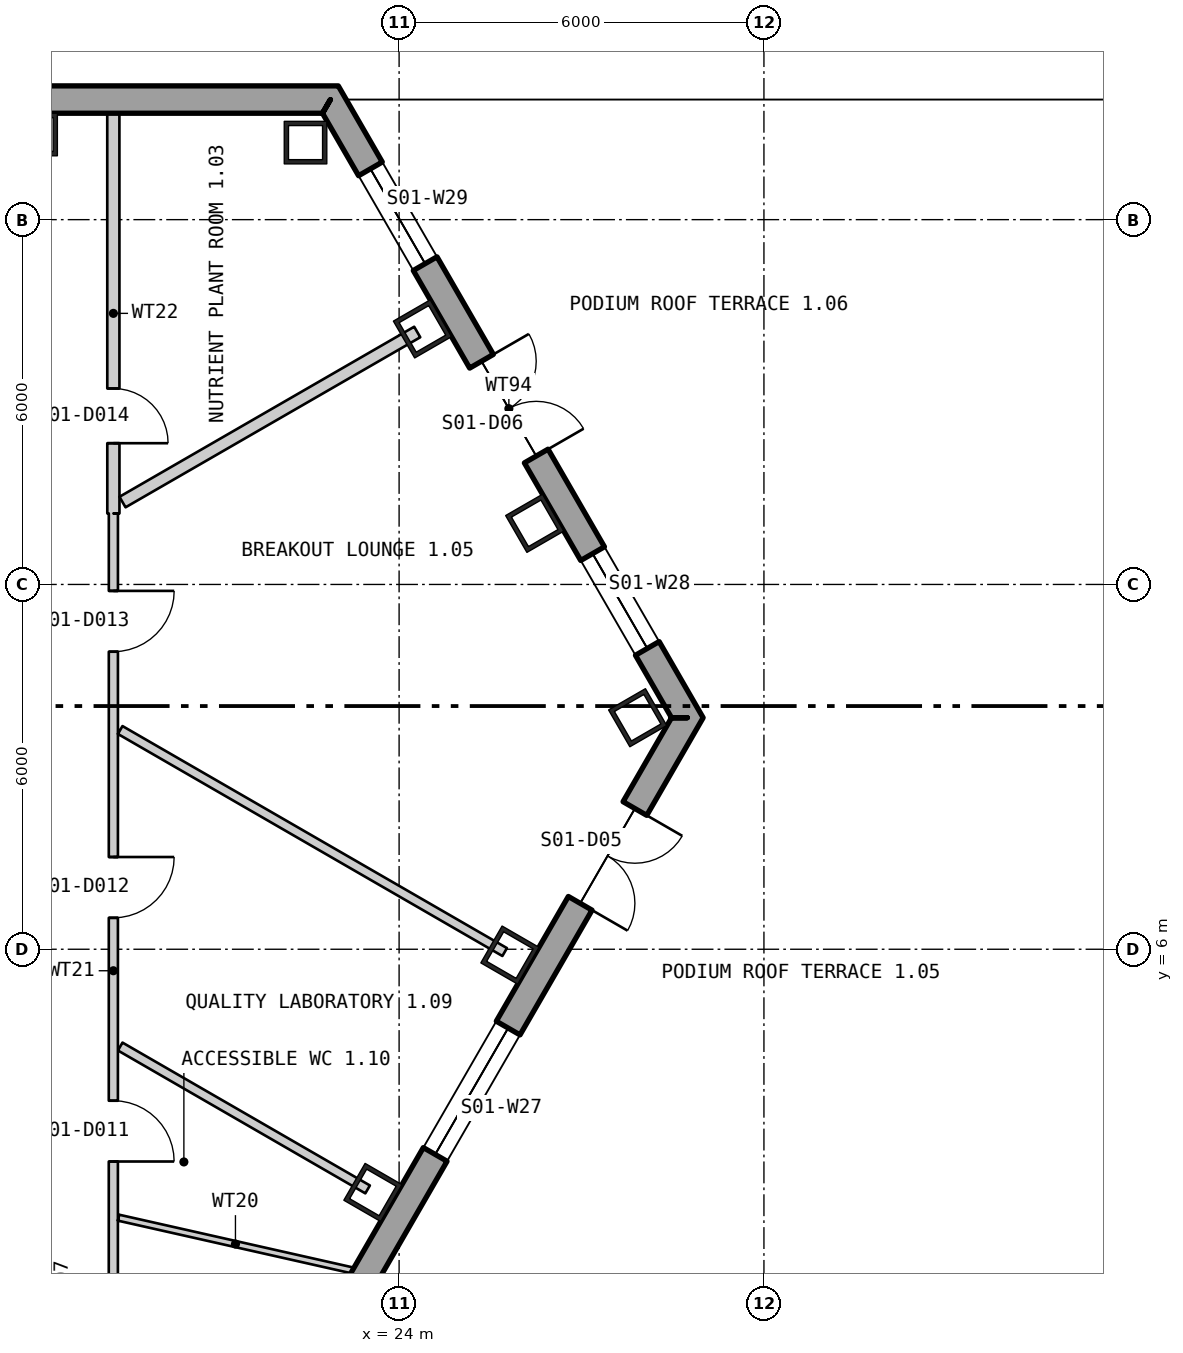
"""IFC4 building model, lengths in metres.
Left out: names, types, materials, properties, quantities, classifications, styles, units other than length and angle.
Written with IfcOpenShell. Run it as: python <this file> out.ifc"""

import sys

from ifc_helpers import new_model, si_unit, direction, frame, frame_2d, origin, origin_2d, place, context, subcontext, project, spatial, polyline, rectangle, hollow_rectangle, outline, extrude, element, fill, save


model = new_model("IFC4")
c1 = context("Model", 3, precision=1e-05, world=origin(), true_north=direction((0.0, 1.0)))
c2 = subcontext(c1, "Body", "Model", "MODEL_VIEW")
j1 = project(units=[si_unit("LENGTHUNIT", "METRE"), si_unit("PLANEANGLEUNIT", "RADIAN")], contexts=[c1])
p1 = place(None, origin())
s1 = spatial("IfcSite", under=j1, at=p1, CompositionType="ELEMENT")
p2 = place(p1, origin())
s2 = spatial("IfcBuilding", under=s1, at=p2, CompositionType="ELEMENT")
p3 = place(p2, frame((0.0, 0.0, 28.8)))
s3 = spatial("IfcBuildingStorey", under=s2, at=p3, CompositionType="ELEMENT", Elevation=28.8)
p4 = place(p3, frame((22.461, 19.267, 0.0), z_axis=(0.0, 0.0, 1.0), x_axis=(-1.0, 0.0, 0.0)))
e1 = element("IfcColumn", 1, at=p4, inside=s3, PredefinedType="COLUMN", context=c2, shape_type="SweptSolid", body=[
    extrude(hollow_rectangle(XDim=0.7, YDim=0.7, WallThickness=0.07, at=origin_2d()), origin(), (0.0, 0.0, 1.0), 4.5),
])
p5 = place(p3, frame((18.03, 19.4, -0.85), z_axis=(0.0, 0.0, 1.0), x_axis=(-1.0, 0.0, 0.0)))
e2 = element("IfcColumn", 2, at=p5, inside=s3, PredefinedType="COLUMN", context=c2, shape_type="SweptSolid", body=[
    extrude(hollow_rectangle(XDim=0.7, YDim=0.7, WallThickness=0.07, at=origin_2d()), origin(), (0.0, 0.0, 1.0), 5.35),
])
p6 = place(p3, frame((23.569, 2.0, 0.0), z_axis=(0.0, 0.0, 1.0), x_axis=(0.5, 0.866025403784, 0.0)))
e3 = element("IfcColumn", 3, at=p6, inside=s3, PredefinedType="COLUMN", context=c2, shape_type="SweptSolid", body=[
    extrude(hollow_rectangle(XDim=0.7, YDim=0.7, WallThickness=0.07, at=origin_2d()), origin(), (0.0, 0.0, 1.0), 4.5),
])
p7 = place(p3, frame((25.822, 5.904, -0.85), z_axis=(0.0, 0.0, 1.0), x_axis=(0.5, 0.866025403784, 0.0)))
e4 = element("IfcColumn", 4, at=p7, inside=s3, PredefinedType="COLUMN", context=c2, shape_type="SweptSolid", body=[
    extrude(hollow_rectangle(XDim=0.7, YDim=0.7, WallThickness=0.07, at=origin_2d()), origin(), (0.0, 0.0, 1.0), 5.35),
])
p8 = place(p3, frame((27.923, 9.808, 0.0), z_axis=(0.0, 0.0, 1.0), x_axis=(-0.5, 0.866025403784, 0.0)))
e5 = element("IfcColumn", 5, at=p8, inside=s3, PredefinedType="COLUMN", context=c2, shape_type="SweptSolid", body=[
    extrude(hollow_rectangle(XDim=0.7, YDim=0.7, WallThickness=0.07, at=origin_2d()), origin(), (0.0, 0.0, 1.0), 4.5),
])
for number, where, z_axis, x_axis in (
    (6, (26.23, 13.005, -0.85), (0.0, 0.0, 1.0), (-0.5, 0.866, 0.0)),
    (7, (24.384, 16.203, -0.85), (0.0, 0.0, 1.0), (-0.5, 0.866, 0.0)),
):
    element("IfcColumn", number, at=place(p3, frame(where, z_axis=z_axis, x_axis=x_axis)), inside=s3, PredefinedType="COLUMN", context=c2, shape_type="SweptSolid", body=[
        extrude(hollow_rectangle(XDim=0.7, YDim=0.7, WallThickness=0.07, at=origin_2d()), origin(), (0.0, 0.0, 1.0), 5.35),
    ])
p9 = place(p3, frame((22.87, 19.975, -0.4), z_axis=(0.0, 0.0, 1.0), x_axis=(-1.0, 0.0, 0.0)))
e8 = element("IfcWall", 8, at=p9, inside=s3, PredefinedType="SOLIDWALL", context=c2, shape_type="SweptSolid", body=[
    extrude(outline(polyline([(-0.13, -0.225), (45.87, -0.225), (45.61, 0.225), (0.13, 0.225), (-0.13, -0.225)])), origin(), (0.0, 0.0, 1.0), 4.5),
])
p10 = place(p9, frame((5.893, 0.0, 1.3)))
e9 = element("IfcOpeningElement", 9, at=p10, cuts=e8, PredefinedType="OPENING", context=c2, shape_type="SweptSolid", body=[
    extrude(rectangle(XDim=2.4, YDim=2.6, at=frame_2d((1.2, 1.3))), frame((0.0, 0.235, 0.0), z_axis=(0.0, -1.0, 0.0), x_axis=(1.0, 0.0, 0.0)), (0.0, 0.0, 1.0), 0.47),
])
p11 = place(p9, frame((10.401, 0.0, 1.3)))
e10 = element("IfcOpeningElement", 10, at=p11, cuts=e8, PredefinedType="OPENING", context=c2, shape_type="SweptSolid", body=[
    extrude(rectangle(XDim=2.4, YDim=2.6, at=frame_2d((1.2, 1.3))), frame((0.0, 0.235, 0.0), z_axis=(0.0, -1.0, 0.0), x_axis=(1.0, 0.0, 0.0)), (0.0, 0.0, 1.0), 0.47),
])
p12 = place(p9, frame((14.909, 0.0, 1.3)))
e11 = element("IfcOpeningElement", 11, at=p12, cuts=e8, PredefinedType="OPENING", context=c2, shape_type="SweptSolid", body=[
    extrude(rectangle(XDim=2.4, YDim=2.6, at=frame_2d((1.2, 1.3))), frame((0.0, 0.235, 0.0), z_axis=(0.0, -1.0, 0.0), x_axis=(1.0, 0.0, 0.0)), (0.0, 0.0, 1.0), 0.47),
])
p13 = place(p9, frame((19.416, 0.0, 1.3)))
e12 = element("IfcOpeningElement", 12, at=p13, cuts=e8, PredefinedType="OPENING", context=c2, shape_type="SweptSolid", body=[
    extrude(rectangle(XDim=2.4, YDim=2.6, at=frame_2d((1.2, 1.3))), frame((0.0, 0.235, 0.0), z_axis=(0.0, -1.0, 0.0), x_axis=(1.0, 0.0, 0.0)), (0.0, 0.0, 1.0), 0.47),
])
p14 = place(p9, frame((23.924, 0.0, 1.3)))
e13 = element("IfcOpeningElement", 13, at=p14, cuts=e8, PredefinedType="OPENING", context=c2, shape_type="SweptSolid", body=[
    extrude(rectangle(XDim=2.4, YDim=2.6, at=frame_2d((1.2, 1.3))), frame((0.0, 0.235, 0.0), z_axis=(0.0, -1.0, 0.0), x_axis=(1.0, 0.0, 0.0)), (0.0, 0.0, 1.0), 0.47),
])
p15 = place(p9, frame((28.431, 0.0, 1.3)))
e14 = element("IfcOpeningElement", 14, at=p15, cuts=e8, PredefinedType="OPENING", context=c2, shape_type="SweptSolid", body=[
    extrude(rectangle(XDim=2.4, YDim=2.6, at=frame_2d((1.2, 1.3))), frame((0.0, 0.235, 0.0), z_axis=(0.0, -1.0, 0.0), x_axis=(1.0, 0.0, 0.0)), (0.0, 0.0, 1.0), 0.47),
])
p16 = place(p9, frame((32.939, 0.0, 1.3)))
e15 = element("IfcOpeningElement", 15, at=p16, cuts=e8, PredefinedType="OPENING", context=c2, shape_type="SweptSolid", body=[
    extrude(rectangle(XDim=2.4, YDim=2.6, at=frame_2d((1.2, 1.3))), frame((0.0, 0.235, 0.0), z_axis=(0.0, -1.0, 0.0), x_axis=(1.0, 0.0, 0.0)), (0.0, 0.0, 1.0), 0.47),
])
p17 = place(p9, frame((37.447, 0.0, 1.3)))
e16 = element("IfcOpeningElement", 16, at=p17, cuts=e8, PredefinedType="OPENING", context=c2, shape_type="SweptSolid", body=[
    extrude(rectangle(XDim=2.4, YDim=2.6, at=frame_2d((1.2, 1.3))), frame((0.0, 0.235, 0.0), z_axis=(0.0, -1.0, 0.0), x_axis=(1.0, 0.0, 0.0)), (0.0, 0.0, 1.0), 0.47),
])
p18 = place(p3, frame((5.87, -29.805, -0.23), z_axis=(0.0, 0.0, 1.0), x_axis=(0.499999764979, 0.866025539474, 0.0)))
e17 = element("IfcWall", 17, at=p18, inside=s3, PredefinedType="SOLIDWALL", context=c2, shape_type="SweptSolid", body=[
    extrude(outline(polyline([(-0.13, -0.225), (45.87, -0.225), (45.61, 0.225), (0.13, 0.225), (-0.13, -0.225)])), origin(), (0.0, 0.0, 1.0), 4.55),
])
p19 = place(p18, frame((1.424, 0.0, 1.13)))
e18 = element("IfcOpeningElement", 18, at=p19, cuts=e17, PredefinedType="OPENING", context=c2, shape_type="SweptSolid", body=[
    extrude(rectangle(XDim=2.4, YDim=2.6, at=frame_2d((1.2, 1.3))), frame((0.0, 0.235, 0.0), z_axis=(0.0, -1.0, 0.0), x_axis=(1.0, 0.0, 0.0)), (0.0, 0.0, 1.0), 0.47),
])
p20 = place(p18, frame((5.893, 0.0, 1.13)))
e19 = element("IfcOpeningElement", 19, at=p20, cuts=e17, PredefinedType="OPENING", context=c2, shape_type="SweptSolid", body=[
    extrude(rectangle(XDim=2.4, YDim=2.6, at=frame_2d((1.2, 1.3))), frame((0.0, 0.235, 0.0), z_axis=(0.0, -1.0, 0.0), x_axis=(1.0, 0.0, 0.0)), (0.0, 0.0, 1.0), 0.47),
])
p21 = place(p18, frame((10.701, 0.0, 0.23)))
e20 = element("IfcOpeningElement", 20, at=p21, cuts=e17, PredefinedType="OPENING", context=c2, shape_type="SweptSolid", body=[
    extrude(rectangle(XDim=1.8, YDim=2.4, at=frame_2d((0.9, 1.2))), frame((0.0, 0.235, 0.0), z_axis=(0.0, -1.0, 0.0), x_axis=(1.0, 0.0, 0.0)), (0.0, 0.0, 1.0), 0.47),
])
p22 = place(p18, frame((14.909, 0.0, 1.13)))
e21 = element("IfcOpeningElement", 21, at=p22, cuts=e17, PredefinedType="OPENING", context=c2, shape_type="SweptSolid", body=[
    extrude(rectangle(XDim=2.4, YDim=2.6, at=frame_2d((1.2, 1.3))), frame((0.0, 0.235, 0.0), z_axis=(0.0, -1.0, 0.0), x_axis=(1.0, 0.0, 0.0)), (0.0, 0.0, 1.0), 0.47),
])
p23 = place(p18, frame((19.416, 0.0, 1.13)))
e22 = element("IfcOpeningElement", 22, at=p23, cuts=e17, PredefinedType="OPENING", context=c2, shape_type="SweptSolid", body=[
    extrude(rectangle(XDim=2.4, YDim=2.6, at=frame_2d((1.2, 1.3))), frame((0.0, 0.235, 0.0), z_axis=(0.0, -1.0, 0.0), x_axis=(1.0, 0.0, 0.0)), (0.0, 0.0, 1.0), 0.47),
])
p24 = place(p18, frame((23.924, 0.0, 1.13)))
e23 = element("IfcOpeningElement", 23, at=p24, cuts=e17, PredefinedType="OPENING", context=c2, shape_type="SweptSolid", body=[
    extrude(rectangle(XDim=2.4, YDim=2.6, at=frame_2d((1.2, 1.3))), frame((0.0, 0.235, 0.0), z_axis=(0.0, -1.0, 0.0), x_axis=(1.0, 0.0, 0.0)), (0.0, 0.0, 1.0), 0.47),
])
p25 = place(p18, frame((37.447, 0.0, 1.13)))
e24 = element("IfcOpeningElement", 24, at=p25, cuts=e17, PredefinedType="OPENING", context=c2, shape_type="SweptSolid", body=[
    extrude(rectangle(XDim=2.4, YDim=2.6, at=frame_2d((1.2, 1.3))), frame((0.0, 0.235, 0.0), z_axis=(0.0, -1.0, 0.0), x_axis=(1.0, 0.0, 0.0)), (0.0, 0.0, 1.0), 0.47),
])
p26 = place(p18, frame((42.216, 0.0, 0.23)))
e25 = element("IfcOpeningElement", 25, at=p26, cuts=e17, PredefinedType="OPENING", context=c2, shape_type="SweptSolid", body=[
    extrude(rectangle(XDim=1.8, YDim=2.4, at=frame_2d((0.9, 1.2))), frame((0.0, 0.235, 0.0), z_axis=(0.0, -1.0, 0.0), x_axis=(1.0, 0.0, 0.0)), (0.0, 0.0, 1.0), 0.47),
])
p27 = place(p3, frame((28.74, 9.808, -0.23), z_axis=(0.0, 0.0, 1.0), x_axis=(-0.500000422144, 0.866025160059, 0.0)))
e26 = element("IfcWall", 26, at=p27, inside=s3, PredefinedType="SOLIDWALL", context=c2, shape_type="SweptSolid", body=[
    extrude(outline(polyline([(-0.13, -0.225), (11.87, -0.225), (11.61, 0.225), (0.13, 0.225), (-0.13, -0.225)])), origin(), (0.0, 0.0, 1.0), 4.33),
])
p28 = place(p27, frame((1.316, 0.0, 1.13)))
e27 = element("IfcOpeningElement", 27, at=p28, cuts=e26, PredefinedType="OPENING", context=c2, shape_type="SweptSolid", body=[
    extrude(rectangle(XDim=1.8, YDim=2.6, at=frame_2d((0.9, 1.3))), frame((0.0, 0.235, 0.0), z_axis=(0.0, -1.0, 0.0), x_axis=(1.0, 0.0, 0.0)), (0.0, 0.0, 1.0), 0.47),
])
p29 = place(p27, frame((4.97, 0.0, 0.23)))
e28 = element("IfcOpeningElement", 28, at=p29, cuts=e26, PredefinedType="OPENING", context=c2, shape_type="SweptSolid", body=[
    extrude(rectangle(XDim=1.8, YDim=2.4, at=frame_2d((0.9, 1.2))), frame((0.0, 0.235, 0.0), z_axis=(0.0, -1.0, 0.0), x_axis=(1.0, 0.0, 0.0)), (0.0, 0.0, 1.0), 0.47),
])
p30 = place(p27, frame((8.624, 0.0, 1.13)))
e29 = element("IfcOpeningElement", 29, at=p30, cuts=e26, PredefinedType="OPENING", context=c2, shape_type="SweptSolid", body=[
    extrude(rectangle(XDim=1.8, YDim=2.6, at=frame_2d((0.9, 1.3))), frame((0.0, 0.235, 0.0), z_axis=(0.0, -1.0, 0.0), x_axis=(1.0, 0.0, 0.0)), (0.0, 0.0, 1.0), 0.47),
])
p31 = place(p3, frame((38.85, 19.975, -0.4), z_axis=(0.0, 0.0, 1.0), x_axis=(-1.0, 0.0, 0.0)))
e30 = element("IfcWall", 30, at=p31, inside=s3, PredefinedType="PARAPET", context=c2, shape_type="SweptSolid", body=[
    extrude(outline(polyline([(-0.15, -0.15), (15.85, -0.15), (15.85, 0.15), (0.15, 0.15), (-0.15, -0.15)])), origin(), (0.0, 0.0, 1.0), 1.5),
])
p32 = place(p3, frame((19.3, -1.875, 0.0), z_axis=(0.0, 0.0, 1.0), x_axis=(6.6476102e-05, 0.99999999779, 0.0)))
e31 = element("IfcWall", 31, at=p32, inside=s3, PredefinedType="PARTITIONING", context=c2, shape_type="SweptSolid", body=[
    extrude(rectangle(XDim=15.043, YDim=0.15, at=frame_2d((7.521, 0.0))), origin(), (0.0, 0.0, 1.0), 4.3),
])
p33 = place(p32, frame((1.277, 0.0, 0.0)))
e32 = element("IfcOpeningElement", 32, at=p33, cuts=e31, PredefinedType="OPENING", context=c2, shape_type="SweptSolid", body=[
    extrude(rectangle(XDim=1.0, YDim=2.1, at=frame_2d((0.5, 1.05))), frame((0.0, 0.085, 0.0), z_axis=(0.0, -1.0, 0.0), x_axis=(1.0, 0.0, 0.0)), (0.0, 0.0, 1.0), 0.17),
])
p34 = place(p32, frame((4.384, 0.0, 0.0)))
e33 = element("IfcOpeningElement", 33, at=p34, cuts=e31, PredefinedType="OPENING", context=c2, shape_type="SweptSolid", body=[
    extrude(rectangle(XDim=1.0, YDim=2.1, at=frame_2d((0.5, 1.05))), frame((0.0, 0.085, 0.0), z_axis=(0.0, -1.0, 0.0), x_axis=(1.0, 0.0, 0.0)), (0.0, 0.0, 1.0), 0.17),
])
p35 = place(p32, frame((8.392, 0.0, 0.0)))
e34 = element("IfcOpeningElement", 34, at=p35, cuts=e31, PredefinedType="OPENING", context=c2, shape_type="SweptSolid", body=[
    extrude(rectangle(XDim=1.0, YDim=2.1, at=frame_2d((0.5, 1.05))), frame((0.0, 0.085, 0.0), z_axis=(0.0, -1.0, 0.0), x_axis=(1.0, 0.0, 0.0)), (0.0, 0.0, 1.0), 0.17),
])
p36 = place(p32, frame((12.769, 0.0, 0.0)))
e35 = element("IfcOpeningElement", 35, at=p36, cuts=e31, PredefinedType="OPENING", context=c2, shape_type="SweptSolid", body=[
    extrude(rectangle(XDim=1.0, YDim=2.1, at=frame_2d((0.5, 1.05))), frame((0.0, 0.085, 0.0), z_axis=(0.0, -1.0, 0.0), x_axis=(1.0, 0.0, 0.0)), (0.0, 0.0, 1.0), 0.17),
])
p37 = place(p3, frame((19.3, 19.749, 0.0), z_axis=(0.0, 0.0, 1.0), x_axis=(0.000151952589, -0.999999988455, 0.0)))
e36 = element("IfcWall", 36, at=p37, inside=s3, PredefinedType="PARTITIONING", context=c2, shape_type="SweptSolid", body=[
    extrude(rectangle(XDim=6.581, YDim=0.2, at=frame_2d((3.291, 0.0))), origin(), (0.0, 0.0, 1.0), 4.3),
])
p38 = place(p37, frame((4.526, 0.0, 0.0)))
e37 = element("IfcOpeningElement", 37, at=p38, cuts=e36, PredefinedType="OPENING", context=c2, shape_type="SweptSolid", body=[
    extrude(rectangle(XDim=0.9, YDim=2.1, at=frame_2d((0.45, 1.05))), frame((0.0, 0.11, 0.0), z_axis=(0.0, -1.0, 0.0), x_axis=(1.0, 0.0, 0.0)), (0.0, 0.0, 1.0), 0.22),
])
p39 = place(p3, frame((19.386, 1.585, 0.0), z_axis=(0.0, 0.0, 1.0), x_axis=(0.975507775366, -0.219964952209, 0.0)))
e38 = element("IfcWall", 38, at=p39, inside=s3, PredefinedType="PARTITIONING", context=c2, shape_type="SweptSolid", body=[
    extrude(rectangle(XDim=3.942, YDim=0.1, at=frame_2d((1.971, 0.0))), origin(), (0.0, 0.0, 1.0), 4.3),
])
p40 = place(p3, frame((19.413, 4.4, 0.0), z_axis=(0.0, 0.0, 1.0), x_axis=(0.865955197451, -0.500121581226, 0.0)))
e39 = element("IfcWall", 39, at=p40, inside=s3, PredefinedType="PARTITIONING", context=c2, shape_type="SweptSolid", body=[
    extrude(rectangle(XDim=4.699, YDim=0.15, at=frame_2d((2.349, 0.0))), origin(), (0.0, 0.0, 1.0), 4.3),
])
p41 = place(p3, frame((19.413, 9.606, 0.0), z_axis=(0.0, 0.0, 1.0), x_axis=(0.865941524513, -0.500145255025, 0.0)))
e40 = element("IfcWall", 40, at=p41, inside=s3, PredefinedType="PARTITIONING", context=c2, shape_type="SweptSolid", body=[
    extrude(rectangle(XDim=7.302, YDim=0.15, at=frame_2d((3.651, 0.0))), origin(), (0.0, 0.0, 1.0), 4.3),
])
p42 = place(p3, frame((19.451, 13.355, 0.0), z_axis=(0.0, 0.0, 1.0), x_axis=(0.866135007536, 0.499810112663, 0.0)))
e41 = element("IfcWall", 41, at=p42, inside=s3, PredefinedType="PARTITIONING", context=c2, shape_type="SweptSolid", body=[
    extrude(rectangle(XDim=5.596, YDim=0.2, at=frame_2d((2.798, 0.0))), origin(), (0.0, 0.0, 1.0), 4.3),
])
p43 = place(p25, origin())
e42 = element("IfcWindow", 42, at=p43, inside=s3, PartitioningType="SINGLE_PANEL", PredefinedType="WINDOW", context=c2, shape_type="SweptSolid", body=[
    extrude(rectangle(XDim=2.4, YDim=2.6, at=frame_2d((1.2, 1.3))), frame((0.0, 0.105, 0.0), z_axis=(0.0, -1.0, 0.0), x_axis=(1.0, 0.0, 0.0)), (0.0, 0.0, 1.0), 0.06),
])
fill(e24, e42)
p44 = place(p26, frame((1.8, 0.0, 0.0), z_axis=(0.0, 0.0, 1.0), x_axis=(-1.0, 0.0, 0.0)))
e43 = element("IfcDoor", 43, at=p44, inside=s3, OperationType="DOUBLE_DOOR_SINGLE_SWING", PredefinedType="DOOR", context=c2, shape_type="SweptSolid", body=[
    extrude(rectangle(XDim=1.8, YDim=2.4, at=frame_2d((0.9, 1.2))), frame((0.0, 0.025, 0.0), z_axis=(0.0, -1.0, 0.0), x_axis=(1.0, 0.0, 0.0)), (0.0, 0.0, 1.0), 0.05),
])
fill(e25, e43)
p45 = place(p28, origin())
e44 = element("IfcWindow", 44, at=p45, inside=s3, PartitioningType="SINGLE_PANEL", PredefinedType="WINDOW", context=c2, shape_type="SweptSolid", body=[
    extrude(rectangle(XDim=1.8, YDim=2.6, at=frame_2d((0.9, 1.3))), frame((0.0, 0.105, 0.0), z_axis=(0.0, -1.0, 0.0), x_axis=(1.0, 0.0, 0.0)), (0.0, 0.0, 1.0), 0.06),
])
fill(e27, e44)
p46 = place(p29, frame((1.8, 0.0, 0.0), z_axis=(0.0, 0.0, 1.0), x_axis=(-1.0, 0.0, 0.0)))
e45 = element("IfcDoor", 45, at=p46, inside=s3, OperationType="DOUBLE_DOOR_SINGLE_SWING", PredefinedType="DOOR", context=c2, shape_type="SweptSolid", body=[
    extrude(rectangle(XDim=1.8, YDim=2.4, at=frame_2d((0.9, 1.2))), frame((0.0, 0.025, 0.0), z_axis=(0.0, -1.0, 0.0), x_axis=(1.0, 0.0, 0.0)), (0.0, 0.0, 1.0), 0.05),
])
fill(e28, e45)
p47 = place(p30, origin())
e46 = element("IfcWindow", 46, at=p47, inside=s3, PartitioningType="SINGLE_PANEL", PredefinedType="WINDOW", context=c2, shape_type="SweptSolid", body=[
    extrude(rectangle(XDim=1.8, YDim=2.6, at=frame_2d((0.9, 1.3))), frame((0.0, 0.105, 0.0), z_axis=(0.0, -1.0, 0.0), x_axis=(1.0, 0.0, 0.0)), (0.0, 0.0, 1.0), 0.06),
])
fill(e29, e46)
p48 = place(p34, origin())
e47 = element("IfcDoor", 47, at=p48, inside=s3, OperationType="SINGLE_SWING_LEFT", PredefinedType="DOOR", context=c2, shape_type="SweptSolid", body=[
    extrude(rectangle(XDim=1.0, YDim=2.1, at=frame_2d((0.5, 1.05))), frame((0.0, 0.025, 0.0), z_axis=(0.0, -1.0, 0.0), x_axis=(1.0, 0.0, 0.0)), (0.0, 0.0, 1.0), 0.05),
])
fill(e33, e47)
p49 = place(p35, origin())
e48 = element("IfcDoor", 48, at=p49, inside=s3, OperationType="SINGLE_SWING_RIGHT", PredefinedType="DOOR", context=c2, shape_type="SweptSolid", body=[
    extrude(rectangle(XDim=1.0, YDim=2.1, at=frame_2d((0.5, 1.05))), frame((0.0, 0.025, 0.0), z_axis=(0.0, -1.0, 0.0), x_axis=(1.0, 0.0, 0.0)), (0.0, 0.0, 1.0), 0.05),
])
fill(e34, e48)
p50 = place(p36, origin())
e49 = element("IfcDoor", 49, at=p50, inside=s3, OperationType="SINGLE_SWING_RIGHT", PredefinedType="DOOR", context=c2, shape_type="SweptSolid", body=[
    extrude(rectangle(XDim=1.0, YDim=2.1, at=frame_2d((0.5, 1.05))), frame((0.0, 0.025, 0.0), z_axis=(0.0, -1.0, 0.0), x_axis=(1.0, 0.0, 0.0)), (0.0, 0.0, 1.0), 0.05),
])
fill(e35, e49)
p51 = place(p38, origin())
e50 = element("IfcDoor", 50, at=p51, inside=s3, OperationType="SINGLE_SWING_LEFT", PredefinedType="DOOR", context=c2, shape_type="SweptSolid", body=[
    extrude(rectangle(XDim=0.9, YDim=2.1, at=frame_2d((0.45, 1.05))), frame((0.0, 0.025, 0.0), z_axis=(0.0, -1.0, 0.0), x_axis=(1.0, 0.0, 0.0)), (0.0, 0.0, 1.0), 0.05),
])
fill(e37, e50)
save(model, sys.argv[1])
